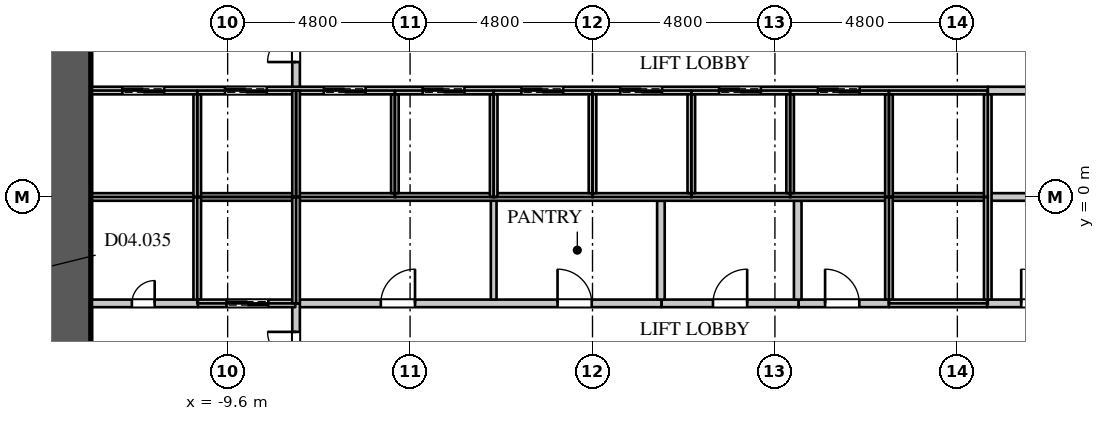
"""IFC4 building model, lengths in metres.
Left out: names, types, materials, properties, quantities, classifications, styles, units other than length and angle.
Written with IfcOpenShell. Run it as: python <this file> out.ifc"""

import sys

from ifc_helpers import new_model, si_unit, direction, frame, frame_2d, origin, place, context, subcontext, project, spatial, rectangle, extrude, element, fill, save


model = new_model("IFC4")
c1 = context("Model", 3, precision=1e-05, world=origin(), true_north=direction((0.0, 1.0)))
c2 = subcontext(c1, "Body", "Model", "MODEL_VIEW")
j1 = project(units=[si_unit("LENGTHUNIT", "METRE"), si_unit("PLANEANGLEUNIT", "RADIAN")], contexts=[c1])
p1 = place(None, origin())
s1 = spatial("IfcSite", under=j1, at=p1, CompositionType="ELEMENT")
p2 = place(p1, origin())
s2 = spatial("IfcBuilding", under=s1, at=p2, CompositionType="ELEMENT")
p3 = place(p2, frame((0.0, 0.0, 21.0)))
s3 = spatial("IfcBuildingStorey", under=s2, at=p3, CompositionType="ELEMENT", Elevation=21.0)
p4 = place(p3, frame((-13.8, -10.8, 0.0), z_axis=(0.0, 0.0, 1.0), x_axis=(0.0, 1.0, 0.0)))
e1 = element("IfcWall", 1, at=p4, inside=s3, PredefinedType="SHEAR", context=c2, shape_type="SweptSolid", body=[
    extrude(rectangle(XDim=21.6, YDim=1.2, at=frame_2d((10.8, 0.0))), origin(), (0.0, 0.0, 1.0), 4.5),
])
p5 = place(p4, frame((15.5, 0.0, 0.0)))
e2 = element("IfcOpeningElement", 2, at=p5, cuts=e1, PredefinedType="OPENING", context=c2, shape_type="SweptSolid", body=[
    extrude(rectangle(XDim=1.5, YDim=2.4, at=frame_2d((0.75, 1.2))), frame((0.0, 0.61, 0.0), z_axis=(0.0, -1.0, 0.0), x_axis=(1.0, 0.0, 0.0)), (0.0, 0.0, 1.0), 1.22),
])
p6 = place(p4, frame((4.5, 0.0, 0.0)))
e3 = element("IfcOpeningElement", 3, at=p6, cuts=e1, PredefinedType="OPENING", context=c2, shape_type="SweptSolid", body=[
    extrude(rectangle(XDim=1.5, YDim=2.4, at=frame_2d((0.75, 1.2))), frame((0.0, 0.61, 0.0), z_axis=(0.0, -1.0, 0.0), x_axis=(1.0, 0.0, 0.0)), (0.0, 0.0, 1.0), 1.22),
])
p7 = place(p3, frame((-7.82, -2.8, 0.0), z_axis=(0.0, 0.0, 1.0), x_axis=(1.0, 0.0, 0.0)))
e4 = element("IfcWall", 4, at=p7, inside=s3, PredefinedType="PARTITIONING", context=c2, shape_type="SweptSolid", body=[
    extrude(rectangle(XDim=9.64, YDim=0.2, at=frame_2d((4.82, 0.0))), origin(), (0.0, 0.0, 1.0), 4.25),
])
p8 = place(p7, frame((2.25, 0.0, 0.0)))
e5 = element("IfcOpeningElement", 5, at=p8, cuts=e4, PredefinedType="OPENING", context=c2, shape_type="SweptSolid", body=[
    extrude(rectangle(XDim=0.9, YDim=2.2, at=frame_2d((0.45, 1.1))), frame((0.0, 0.11, 0.0), z_axis=(0.0, -1.0, 0.0), x_axis=(1.0, 0.0, 0.0)), (0.0, 0.0, 1.0), 0.22),
])
p9 = place(p7, frame((6.9, 0.0, 0.0)))
e6 = element("IfcOpeningElement", 6, at=p9, cuts=e4, PredefinedType="OPENING", context=c2, shape_type="SweptSolid", body=[
    extrude(rectangle(XDim=0.9, YDim=2.2, at=frame_2d((0.45, 1.1))), frame((0.0, 0.11, 0.0), z_axis=(0.0, -1.0, 0.0), x_axis=(1.0, 0.0, 0.0)), (0.0, 0.0, 1.0), 0.22),
])
p10 = place(p3, frame((-7.8, -5.8, 0.0), z_axis=(0.0, 0.0, 1.0), x_axis=(0.0, 1.0, 0.0)))
e7 = element("IfcWall", 7, at=p10, inside=s3, PredefinedType="PARTITIONING", context=c2, shape_type="SweptSolid", body=[
    extrude(rectangle(XDim=3.0, YDim=0.2, at=frame_2d((1.5, 0.0))), origin(), (0.0, 0.0, 1.0), 4.25),
])
p11 = place(p10, frame((0.75, 0.0, 0.0)))
e8 = element("IfcOpeningElement", 8, at=p11, cuts=e7, PredefinedType="OPENING", context=c2, shape_type="SweptSolid", body=[
    extrude(rectangle(XDim=1.5, YDim=2.4, at=frame_2d((0.75, 1.2))), frame((0.0, 0.11, 0.0), z_axis=(0.0, -1.0, 0.0), x_axis=(1.0, 0.0, 0.0)), (0.0, 0.0, 1.0), 0.22),
])
p12 = place(p3, frame((-7.8, 2.8, 0.0), z_axis=(0.0, 0.0, 1.0), x_axis=(0.0, 1.0, 0.0)))
e9 = element("IfcWall", 9, at=p12, inside=s3, PredefinedType="PARTITIONING", context=c2, shape_type="SweptSolid", body=[
    extrude(rectangle(XDim=3.0, YDim=0.2, at=frame_2d((1.5, 0.0))), origin(), (0.0, 0.0, 1.0), 4.25),
])
p13 = place(p12, frame((0.75, 0.0, 0.0)))
e10 = element("IfcOpeningElement", 10, at=p13, cuts=e9, PredefinedType="OPENING", context=c2, shape_type="SweptSolid", body=[
    extrude(rectangle(XDim=1.5, YDim=2.4, at=frame_2d((0.75, 1.2))), frame((0.0, 0.11, 0.0), z_axis=(0.0, -1.0, 0.0), x_axis=(1.0, 0.0, 0.0)), (0.0, 0.0, 1.0), 0.22),
])
p14 = place(p3, frame((5.42, -2.8, 0.0), z_axis=(0.0, 0.0, 1.0), x_axis=(1.0, 0.0, 0.0)))
e11 = element("IfcWall", 11, at=p14, inside=s3, PredefinedType="PARTITIONING", context=c2, shape_type="SweptSolid", body=[
    extrude(rectangle(XDim=2.38, YDim=0.2, at=frame_2d((1.19, 0.0))), origin(), (0.0, 0.0, 1.0), 4.25),
])
p15 = place(p14, frame((0.7, 0.0, 0.0)))
e12 = element("IfcOpeningElement", 12, at=p15, cuts=e11, PredefinedType="OPENING", context=c2, shape_type="SweptSolid", body=[
    extrude(rectangle(XDim=0.9, YDim=2.2, at=frame_2d((0.45, 1.1))), frame((0.0, 0.11, 0.0), z_axis=(0.0, -1.0, 0.0), x_axis=(1.0, 0.0, 0.0)), (0.0, 0.0, 1.0), 0.22),
])
p16 = place(p3, frame((-2.6, -2.7, 0.0), z_axis=(0.0, 0.0, 1.0), x_axis=(0.0, 1.0, 0.0)))
e13 = element("IfcWall", 13, at=p16, inside=s3, PredefinedType="PARTITIONING", context=c2, shape_type="SweptSolid", body=[
    extrude(rectangle(XDim=2.7, YDim=0.15, at=frame_2d((1.35, 0.0))), origin(), (0.0, 0.0, 1.0), 4.25),
])
p17 = place(p3, frame((-13.17, -2.8, 0.0), z_axis=(0.0, 0.0, 1.0), x_axis=(1.0, 0.0, 0.0)))
e14 = element("IfcWall", 14, at=p17, inside=s3, PredefinedType="PARTITIONING", context=c2, shape_type="SweptSolid", body=[
    extrude(rectangle(XDim=2.79, YDim=0.2, at=frame_2d((1.395, 0.0))), origin(), (0.0, 0.0, 1.0), 4.25),
])
p18 = place(p17, frame((1.05, 0.0, 0.0)))
e15 = element("IfcOpeningElement", 15, at=p18, cuts=e14, PredefinedType="OPENING", context=c2, shape_type="SweptSolid", body=[
    extrude(rectangle(XDim=0.6, YDim=2.0, at=frame_2d((0.3, 1.0))), frame((0.0, 0.11, 0.0), z_axis=(0.0, -1.0, 0.0), x_axis=(1.0, 0.0, 0.0)), (0.0, 0.0, 1.0), 0.22),
])
p19 = place(p3, frame((1.82, -2.8, 0.0), z_axis=(0.0, 0.0, 1.0), x_axis=(1.0, 0.0, 0.0)))
e16 = element("IfcWall", 16, at=p19, inside=s3, PredefinedType="PARTITIONING", context=c2, shape_type="SweptSolid", body=[
    extrude(rectangle(XDim=3.6, YDim=0.2, at=frame_2d((1.8, 0.0))), origin(), (0.0, 0.0, 1.0), 4.25),
])
p20 = place(p19, frame((1.35, 0.0, 0.0)))
e17 = element("IfcOpeningElement", 17, at=p20, cuts=e16, PredefinedType="OPENING", context=c2, shape_type="SweptSolid", body=[
    extrude(rectangle(XDim=0.9, YDim=2.2, at=frame_2d((0.45, 1.1))), frame((0.0, 0.11, 0.0), z_axis=(0.0, -1.0, 0.0), x_axis=(1.0, 0.0, 0.0)), (0.0, 0.0, 1.0), 0.22),
])
for number, where, z_axis, x_axis in (
    (18, (1.8, -2.7, 0.0), (0.0, 0.0, 1.0), (0.0, 1.0, 0.0)),
    (19, (5.4, -2.7, 0.0), (0.0, 0.0, 1.0), (0.0, 1.0, 0.0)),
):
    element("IfcWall", number, at=place(p3, frame(where, z_axis=z_axis, x_axis=x_axis)), inside=s3, PredefinedType="PARTITIONING", context=c2, shape_type="SweptSolid", body=[
        extrude(rectangle(XDim=2.6, YDim=0.2, at=frame_2d((1.3, 0.0))), origin(), (0.0, 0.0, 1.0), 4.25),
    ])
p21 = place(p3, frame((10.38, -2.8, 0.0), z_axis=(0.0, 0.0, 1.0), x_axis=(1.0, 0.0, 0.0)))
e20 = element("IfcWall", 20, at=p21, inside=s3, PredefinedType="PARTITIONING", context=c2, shape_type="SweptSolid", body=[
    extrude(rectangle(XDim=2.79, YDim=0.2, at=frame_2d((1.395, 0.0))), origin(), (0.0, 0.0, 1.0), 4.25),
])
p22 = place(p21, frame((0.9, 0.0, 0.0)))
e21 = element("IfcOpeningElement", 21, at=p22, cuts=e20, PredefinedType="OPENING", context=c2, shape_type="SweptSolid", body=[
    extrude(rectangle(XDim=0.9, YDim=2.2, at=frame_2d((0.45, 1.1))), frame((0.0, 0.11, 0.0), z_axis=(0.0, -1.0, 0.0), x_axis=(1.0, 0.0, 0.0)), (0.0, 0.0, 1.0), 0.22),
])
p23 = place(p3, frame((10.4, 2.8, 0.0), z_axis=(0.0, 0.0, 1.0), x_axis=(1.0, 0.0, 0.0)))
e22 = element("IfcWall", 22, at=p23, inside=s3, PredefinedType="PARTITIONING", context=c2, shape_type="SweptSolid", body=[
    extrude(rectangle(XDim=2.77, YDim=0.2, at=frame_2d((1.385, 0.0))), origin(), (0.0, 0.0, 1.0), 4.25),
])
p24 = place(p23, frame((1.05, 0.0, 0.0)))
e23 = element("IfcOpeningElement", 23, at=p24, cuts=e22, PredefinedType="OPENING", context=c2, shape_type="SweptSolid", body=[
    extrude(rectangle(XDim=0.6, YDim=2.0, at=frame_2d((0.3, 1.0))), frame((0.0, 0.11, 0.0), z_axis=(0.0, -1.0, 0.0), x_axis=(1.0, 0.0, 0.0)), (0.0, 0.0, 1.0), 0.22),
])
p25 = place(p3, frame((10.4, 0.0, 0.0), z_axis=(0.0, 0.0, 1.0), x_axis=(1.0, 0.0, 0.0)))
e24 = element("IfcWall", 24, at=p25, inside=s3, PredefinedType="PARTITIONING", context=c2, shape_type="SweptSolid", body=[
    extrude(rectangle(XDim=2.77, YDim=0.2, at=frame_2d((1.385, 0.0))), origin(), (0.0, 0.0, 1.0), 4.25),
])
p26 = place(p3, frame((-13.17, 0.0, 0.0), z_axis=(0.0, 0.0, 1.0), x_axis=(1.0, 0.0, 0.0)))
e25 = element("IfcWall", 25, at=p26, inside=s3, PredefinedType="PARTITIONING", context=c2, shape_type="SweptSolid", body=[
    extrude(rectangle(XDim=23.57, YDim=0.2, at=frame_2d((11.785, 0.0))), origin(), (0.0, 0.0, 1.0), 4.25),
])
p27 = place(p3, frame((-13.17, 2.8, 0.0), z_axis=(0.0, 0.0, 1.0), x_axis=(1.0, 0.0, 0.0)))
e26 = element("IfcWall", 26, at=p27, inside=s3, PredefinedType="PARTITIONING", context=c2, shape_type="SweptSolid", body=[
    extrude(rectangle(XDim=23.57, YDim=0.2, at=frame_2d((11.785, 0.0))), origin(), (0.0, 0.0, 1.0), 4.25),
])
p28 = place(p27, frame((0.8, 0.0, 0.0)))
e27 = element("IfcOpeningElement", 27, at=p28, cuts=e26, PredefinedType="OPENING", context=c2, shape_type="SweptSolid", body=[
    extrude(rectangle(XDim=1.1, YDim=2.2, at=frame_2d((0.55, 1.1))), frame((0.0, 0.11, 0.0), z_axis=(0.0, -1.0, 0.0), x_axis=(1.0, 0.0, 0.0)), (0.0, 0.0, 1.0), 0.22),
])
p29 = place(p27, frame((3.5, 0.0, 0.0)))
e28 = element("IfcOpeningElement", 28, at=p29, cuts=e26, PredefinedType="OPENING", context=c2, shape_type="SweptSolid", body=[
    extrude(rectangle(XDim=1.1, YDim=2.2, at=frame_2d((0.55, 1.1))), frame((0.0, 0.11, 0.0), z_axis=(0.0, -1.0, 0.0), x_axis=(1.0, 0.0, 0.0)), (0.0, 0.0, 1.0), 0.22),
])
p30 = place(p27, frame((6.1, 0.0, 0.0)))
e29 = element("IfcOpeningElement", 29, at=p30, cuts=e26, PredefinedType="OPENING", context=c2, shape_type="SweptSolid", body=[
    extrude(rectangle(XDim=1.1, YDim=2.2, at=frame_2d((0.55, 1.1))), frame((0.0, 0.11, 0.0), z_axis=(0.0, -1.0, 0.0), x_axis=(1.0, 0.0, 0.0)), (0.0, 0.0, 1.0), 0.22),
])
p31 = place(p27, frame((8.7, 0.0, 0.0)))
e30 = element("IfcOpeningElement", 30, at=p31, cuts=e26, PredefinedType="OPENING", context=c2, shape_type="SweptSolid", body=[
    extrude(rectangle(XDim=1.1, YDim=2.2, at=frame_2d((0.55, 1.1))), frame((0.0, 0.11, 0.0), z_axis=(0.0, -1.0, 0.0), x_axis=(1.0, 0.0, 0.0)), (0.0, 0.0, 1.0), 0.22),
])
p32 = place(p27, frame((11.3, 0.0, 0.0)))
e31 = element("IfcOpeningElement", 31, at=p32, cuts=e26, PredefinedType="OPENING", context=c2, shape_type="SweptSolid", body=[
    extrude(rectangle(XDim=1.1, YDim=2.2, at=frame_2d((0.55, 1.1))), frame((0.0, 0.11, 0.0), z_axis=(0.0, -1.0, 0.0), x_axis=(1.0, 0.0, 0.0)), (0.0, 0.0, 1.0), 0.22),
])
p33 = place(p27, frame((13.9, 0.0, 0.0)))
e32 = element("IfcOpeningElement", 32, at=p33, cuts=e26, PredefinedType="OPENING", context=c2, shape_type="SweptSolid", body=[
    extrude(rectangle(XDim=1.1, YDim=2.2, at=frame_2d((0.55, 1.1))), frame((0.0, 0.11, 0.0), z_axis=(0.0, -1.0, 0.0), x_axis=(1.0, 0.0, 0.0)), (0.0, 0.0, 1.0), 0.22),
])
p34 = place(p27, frame((16.5, 0.0, 0.0)))
e33 = element("IfcOpeningElement", 33, at=p34, cuts=e26, PredefinedType="OPENING", context=c2, shape_type="SweptSolid", body=[
    extrude(rectangle(XDim=1.1, YDim=2.2, at=frame_2d((0.55, 1.1))), frame((0.0, 0.11, 0.0), z_axis=(0.0, -1.0, 0.0), x_axis=(1.0, 0.0, 0.0)), (0.0, 0.0, 1.0), 0.22),
])
p35 = place(p27, frame((19.1, 0.0, 0.0)))
e34 = element("IfcOpeningElement", 34, at=p35, cuts=e26, PredefinedType="OPENING", context=c2, shape_type="SweptSolid", body=[
    extrude(rectangle(XDim=1.1, YDim=2.2, at=frame_2d((0.55, 1.1))), frame((0.0, 0.11, 0.0), z_axis=(0.0, -1.0, 0.0), x_axis=(1.0, 0.0, 0.0)), (0.0, 0.0, 1.0), 0.22),
])
p36 = place(p3, frame((-10.4, -2.7, 0.0), z_axis=(0.0, 0.0, 1.0), x_axis=(0.0, 1.0, 0.0)))
e35 = element("IfcWall", 35, at=p36, inside=s3, PredefinedType="PARTITIONING", context=c2, shape_type="SweptSolid", body=[
    extrude(rectangle(XDim=2.7, YDim=0.2, at=frame_2d((1.35, 0.0))), origin(), (0.0, 0.0, 1.0), 4.25),
])
p37 = place(p3, frame((-10.38, -2.8, 0.0), z_axis=(0.0, 0.0, 1.0), x_axis=(1.0, 0.0, 0.0)))
e36 = element("IfcWall", 36, at=p37, inside=s3, PredefinedType="PARTITIONING", context=c2, shape_type="SweptSolid", body=[
    extrude(rectangle(XDim=2.56, YDim=0.2, at=frame_2d((1.28, 0.0))), origin(), (0.0, 0.0, 1.0), 4.25),
])
p38 = place(p37, frame((0.75, 0.0, 0.0)))
e37 = element("IfcOpeningElement", 37, at=p38, cuts=e36, PredefinedType="OPENING", context=c2, shape_type="SweptSolid", body=[
    extrude(rectangle(XDim=1.1, YDim=2.2, at=frame_2d((0.55, 1.1))), frame((0.0, 0.11, 0.0), z_axis=(0.0, -1.0, 0.0), x_axis=(1.0, 0.0, 0.0)), (0.0, 0.0, 1.0), 0.22),
])
p39 = place(p3, frame((-10.4, 0.0, 0.0), z_axis=(0.0, 0.0, 1.0), x_axis=(0.0, 1.0, 0.0)))
e38 = element("IfcWall", 38, at=p39, inside=s3, PredefinedType="PARTITIONING", context=c2, shape_type="SweptSolid", body=[
    extrude(rectangle(XDim=2.7, YDim=0.2, at=frame_2d((1.35, 0.0))), origin(), (0.0, 0.0, 1.0), 4.25),
])
for number, where, z_axis, x_axis in (
    (39, (-7.8, -2.8, 0.0), (0.0, 0.0, 1.0), (0.0, 1.0, 0.0)),
    (40, (-7.8, 0.0, 0.0), (0.0, 0.0, 1.0), (0.0, 1.0, 0.0)),
):
    element("IfcWall", number, at=place(p3, frame(where, z_axis=z_axis, x_axis=x_axis)), inside=s3, PredefinedType="PARTITIONING", context=c2, shape_type="SweptSolid", body=[
        extrude(rectangle(XDim=2.8, YDim=0.2, at=frame_2d((1.4, 0.0))), origin(), (0.0, 0.0, 1.0), 4.25),
    ])
p40 = place(p3, frame((-5.2, 0.1, 0.0), z_axis=(0.0, 0.0, 1.0), x_axis=(0.0, 1.0, 0.0)))
e41 = element("IfcWall", 41, at=p40, inside=s3, PredefinedType="PARTITIONING", context=c2, shape_type="SweptSolid", body=[
    extrude(rectangle(XDim=2.6, YDim=0.2, at=frame_2d((1.3, 0.0))), origin(), (0.0, 0.0, 1.0), 4.25),
])
p41 = place(p3, frame((-2.6, 0.0, 0.0), z_axis=(0.0, 0.0, 1.0), x_axis=(0.0, 1.0, 0.0)))
e42 = element("IfcWall", 42, at=p41, inside=s3, PredefinedType="PARTITIONING", context=c2, shape_type="SweptSolid", body=[
    extrude(rectangle(XDim=2.7, YDim=0.2, at=frame_2d((1.35, 0.0))), origin(), (0.0, 0.0, 1.0), 4.25),
])
for number, where, z_axis, x_axis in (
    (43, (0.0, 0.1, 0.0), (0.0, 0.0, 1.0), (0.0, 1.0, 0.0)),
    (44, (2.6, 0.1, 0.0), (0.0, 0.0, 1.0), (0.0, 1.0, 0.0)),
    (45, (5.2, 0.1, 0.0), (0.0, 0.0, 1.0), (0.0, 1.0, 0.0)),
):
    element("IfcWall", number, at=place(p3, frame(where, z_axis=z_axis, x_axis=x_axis)), inside=s3, PredefinedType="PARTITIONING", context=c2, shape_type="SweptSolid", body=[
        extrude(rectangle(XDim=2.6, YDim=0.2, at=frame_2d((1.3, 0.0))), origin(), (0.0, 0.0, 1.0), 4.25),
    ])
p42 = place(p3, frame((7.8, -2.7, 0.0), z_axis=(0.0, 0.0, 1.0), x_axis=(0.0, 1.0, 0.0)))
e46 = element("IfcWall", 46, at=p42, inside=s3, PredefinedType="PARTITIONING", context=c2, shape_type="SweptSolid", body=[
    extrude(rectangle(XDim=2.7, YDim=0.2, at=frame_2d((1.35, 0.0))), origin(), (0.0, 0.0, 1.0), 4.25),
])
p43 = place(p3, frame((7.8, -2.8, 0.0), z_axis=(0.0, 0.0, 1.0), x_axis=(1.0, 0.0, 0.0)))
e47 = element("IfcWall", 47, at=p43, inside=s3, PredefinedType="PARTITIONING", context=c2, shape_type="SweptSolid", body=[
    extrude(rectangle(XDim=2.58, YDim=0.2, at=frame_2d((1.29, 0.0))), origin(), (0.0, 0.0, 1.0), 4.25),
])
p44 = place(p3, frame((7.8, 0.0, 0.0), z_axis=(0.0, 0.0, 1.0), x_axis=(0.0, 1.0, 0.0)))
e48 = element("IfcWall", 48, at=p44, inside=s3, PredefinedType="PARTITIONING", context=c2, shape_type="SweptSolid", body=[
    extrude(rectangle(XDim=2.7, YDim=0.2, at=frame_2d((1.35, 0.0))), origin(), (0.0, 0.0, 1.0), 4.25),
])
p45 = place(p3, frame((10.4, -2.7, 0.0), z_axis=(0.0, 0.0, 1.0), x_axis=(0.0, 1.0, 0.0)))
e49 = element("IfcWall", 49, at=p45, inside=s3, PredefinedType="PARTITIONING", context=c2, shape_type="SweptSolid", body=[
    extrude(rectangle(XDim=5.4, YDim=0.2, at=frame_2d((2.7, 0.0))), origin(), (0.0, 0.0, 1.0), 4.25),
])
p46 = place(p18, origin())
e50 = element("IfcDoor", 50, at=p46, inside=s3, OperationType="SINGLE_SWING_RIGHT", PredefinedType="DOOR", context=c2, shape_type="SweptSolid", body=[
    extrude(rectangle(XDim=0.6, YDim=2.0, at=frame_2d((0.3, 1.0))), frame((0.0, 0.025, 0.0), z_axis=(0.0, -1.0, 0.0), x_axis=(1.0, 0.0, 0.0)), (0.0, 0.0, 1.0), 0.05),
])
fill(e15, e50)
p47 = place(p22, origin())
e51 = element("IfcDoor", 51, at=p47, inside=s3, OperationType="SINGLE_SWING_LEFT", PredefinedType="DOOR", context=c2, shape_type="SweptSolid", body=[
    extrude(rectangle(XDim=0.9, YDim=2.2, at=frame_2d((0.45, 1.1))), frame((0.0, 0.025, 0.0), z_axis=(0.0, -1.0, 0.0), x_axis=(1.0, 0.0, 0.0)), (0.0, 0.0, 1.0), 0.05),
])
fill(e21, e51)
p48 = place(p8, origin())
e52 = element("IfcDoor", 52, at=p48, inside=s3, OperationType="SINGLE_SWING_RIGHT", PredefinedType="DOOR", context=c2, shape_type="SweptSolid", body=[
    extrude(rectangle(XDim=0.9, YDim=2.2, at=frame_2d((0.45, 1.1))), frame((0.0, 0.025, 0.0), z_axis=(0.0, -1.0, 0.0), x_axis=(1.0, 0.0, 0.0)), (0.0, 0.0, 1.0), 0.05),
])
fill(e5, e52)
p49 = place(p9, origin())
e53 = element("IfcDoor", 53, at=p49, inside=s3, OperationType="SINGLE_SWING_LEFT", PredefinedType="DOOR", context=c2, shape_type="SweptSolid", body=[
    extrude(rectangle(XDim=0.9, YDim=2.2, at=frame_2d((0.45, 1.1))), frame((0.0, 0.025, 0.0), z_axis=(0.0, -1.0, 0.0), x_axis=(1.0, 0.0, 0.0)), (0.0, 0.0, 1.0), 0.05),
])
fill(e6, e53)
p50 = place(p20, origin())
e54 = element("IfcDoor", 54, at=p50, inside=s3, OperationType="SINGLE_SWING_RIGHT", PredefinedType="DOOR", context=c2, shape_type="SweptSolid", body=[
    extrude(rectangle(XDim=0.9, YDim=2.2, at=frame_2d((0.45, 1.1))), frame((0.0, 0.025, 0.0), z_axis=(0.0, -1.0, 0.0), x_axis=(1.0, 0.0, 0.0)), (0.0, 0.0, 1.0), 0.05),
])
fill(e17, e54)
p51 = place(p15, origin())
e55 = element("IfcDoor", 55, at=p51, inside=s3, OperationType="SINGLE_SWING_LEFT", PredefinedType="DOOR", context=c2, shape_type="SweptSolid", body=[
    extrude(rectangle(XDim=0.9, YDim=2.2, at=frame_2d((0.45, 1.1))), frame((0.0, 0.025, 0.0), z_axis=(0.0, -1.0, 0.0), x_axis=(1.0, 0.0, 0.0)), (0.0, 0.0, 1.0), 0.05),
])
fill(e12, e55)
p52 = place(p28, origin())
e56 = element("IfcDoor", 56, at=p52, inside=s3, OperationType="DOUBLE_DOOR_SLIDING", PredefinedType="DOOR", context=c2, shape_type="SweptSolid", body=[
    extrude(rectangle(XDim=1.1, YDim=2.2, at=frame_2d((0.55, 1.1))), frame((0.0, 0.025, 0.0), z_axis=(0.0, -1.0, 0.0), x_axis=(1.0, 0.0, 0.0)), (0.0, 0.0, 1.0), 0.05),
])
fill(e27, e56)
p53 = place(p29, origin())
e57 = element("IfcDoor", 57, at=p53, inside=s3, OperationType="DOUBLE_DOOR_SLIDING", PredefinedType="DOOR", context=c2, shape_type="SweptSolid", body=[
    extrude(rectangle(XDim=1.1, YDim=2.2, at=frame_2d((0.55, 1.1))), frame((0.0, 0.025, 0.0), z_axis=(0.0, -1.0, 0.0), x_axis=(1.0, 0.0, 0.0)), (0.0, 0.0, 1.0), 0.05),
])
fill(e28, e57)
p54 = place(p38, origin())
e58 = element("IfcDoor", 58, at=p54, inside=s3, OperationType="DOUBLE_DOOR_SLIDING", PredefinedType="DOOR", context=c2, shape_type="SweptSolid", body=[
    extrude(rectangle(XDim=1.1, YDim=2.2, at=frame_2d((0.55, 1.1))), frame((0.0, 0.025, 0.0), z_axis=(0.0, -1.0, 0.0), x_axis=(1.0, 0.0, 0.0)), (0.0, 0.0, 1.0), 0.05),
])
fill(e37, e58)
p55 = place(p30, origin())
e59 = element("IfcDoor", 59, at=p55, inside=s3, OperationType="DOUBLE_DOOR_SLIDING", PredefinedType="DOOR", context=c2, shape_type="SweptSolid", body=[
    extrude(rectangle(XDim=1.1, YDim=2.2, at=frame_2d((0.55, 1.1))), frame((0.0, 0.025, 0.0), z_axis=(0.0, -1.0, 0.0), x_axis=(1.0, 0.0, 0.0)), (0.0, 0.0, 1.0), 0.05),
])
fill(e29, e59)
p56 = place(p31, origin())
e60 = element("IfcDoor", 60, at=p56, inside=s3, OperationType="DOUBLE_DOOR_SLIDING", PredefinedType="DOOR", context=c2, shape_type="SweptSolid", body=[
    extrude(rectangle(XDim=1.1, YDim=2.2, at=frame_2d((0.55, 1.1))), frame((0.0, 0.025, 0.0), z_axis=(0.0, -1.0, 0.0), x_axis=(1.0, 0.0, 0.0)), (0.0, 0.0, 1.0), 0.05),
])
fill(e30, e60)
p57 = place(p32, origin())
e61 = element("IfcDoor", 61, at=p57, inside=s3, OperationType="DOUBLE_DOOR_SLIDING", PredefinedType="DOOR", context=c2, shape_type="SweptSolid", body=[
    extrude(rectangle(XDim=1.1, YDim=2.2, at=frame_2d((0.55, 1.1))), frame((0.0, 0.025, 0.0), z_axis=(0.0, -1.0, 0.0), x_axis=(1.0, 0.0, 0.0)), (0.0, 0.0, 1.0), 0.05),
])
fill(e31, e61)
p58 = place(p33, origin())
e62 = element("IfcDoor", 62, at=p58, inside=s3, OperationType="DOUBLE_DOOR_SLIDING", PredefinedType="DOOR", context=c2, shape_type="SweptSolid", body=[
    extrude(rectangle(XDim=1.1, YDim=2.2, at=frame_2d((0.55, 1.1))), frame((0.0, 0.025, 0.0), z_axis=(0.0, -1.0, 0.0), x_axis=(1.0, 0.0, 0.0)), (0.0, 0.0, 1.0), 0.05),
])
fill(e32, e62)
p59 = place(p34, origin())
e63 = element("IfcDoor", 63, at=p59, inside=s3, OperationType="DOUBLE_DOOR_SLIDING", PredefinedType="DOOR", context=c2, shape_type="SweptSolid", body=[
    extrude(rectangle(XDim=1.1, YDim=2.2, at=frame_2d((0.55, 1.1))), frame((0.0, 0.025, 0.0), z_axis=(0.0, -1.0, 0.0), x_axis=(1.0, 0.0, 0.0)), (0.0, 0.0, 1.0), 0.05),
])
fill(e33, e63)
p60 = place(p35, origin())
e64 = element("IfcDoor", 64, at=p60, inside=s3, OperationType="DOUBLE_DOOR_SLIDING", PredefinedType="DOOR", context=c2, shape_type="SweptSolid", body=[
    extrude(rectangle(XDim=1.1, YDim=2.2, at=frame_2d((0.55, 1.1))), frame((0.0, 0.025, 0.0), z_axis=(0.0, -1.0, 0.0), x_axis=(1.0, 0.0, 0.0)), (0.0, 0.0, 1.0), 0.05),
])
fill(e34, e64)
p61 = place(p13, origin())
e65 = element("IfcDoor", 65, at=p61, inside=s3, OperationType="DOUBLE_DOOR_SINGLE_SWING", PredefinedType="DOOR", context=c2, shape_type="SweptSolid", body=[
    extrude(rectangle(XDim=1.5, YDim=2.4, at=frame_2d((0.75, 1.2))), frame((0.0, 0.025, 0.0), z_axis=(0.0, -1.0, 0.0), x_axis=(1.0, 0.0, 0.0)), (0.0, 0.0, 1.0), 0.05),
])
fill(e10, e65)
p62 = place(p11, origin())
e66 = element("IfcDoor", 66, at=p62, inside=s3, OperationType="DOUBLE_DOOR_SINGLE_SWING", PredefinedType="DOOR", context=c2, shape_type="SweptSolid", body=[
    extrude(rectangle(XDim=1.5, YDim=2.4, at=frame_2d((0.75, 1.2))), frame((0.0, 0.025, 0.0), z_axis=(0.0, -1.0, 0.0), x_axis=(1.0, 0.0, 0.0)), (0.0, 0.0, 1.0), 0.05),
])
fill(e8, e66)
save(model, sys.argv[1])
